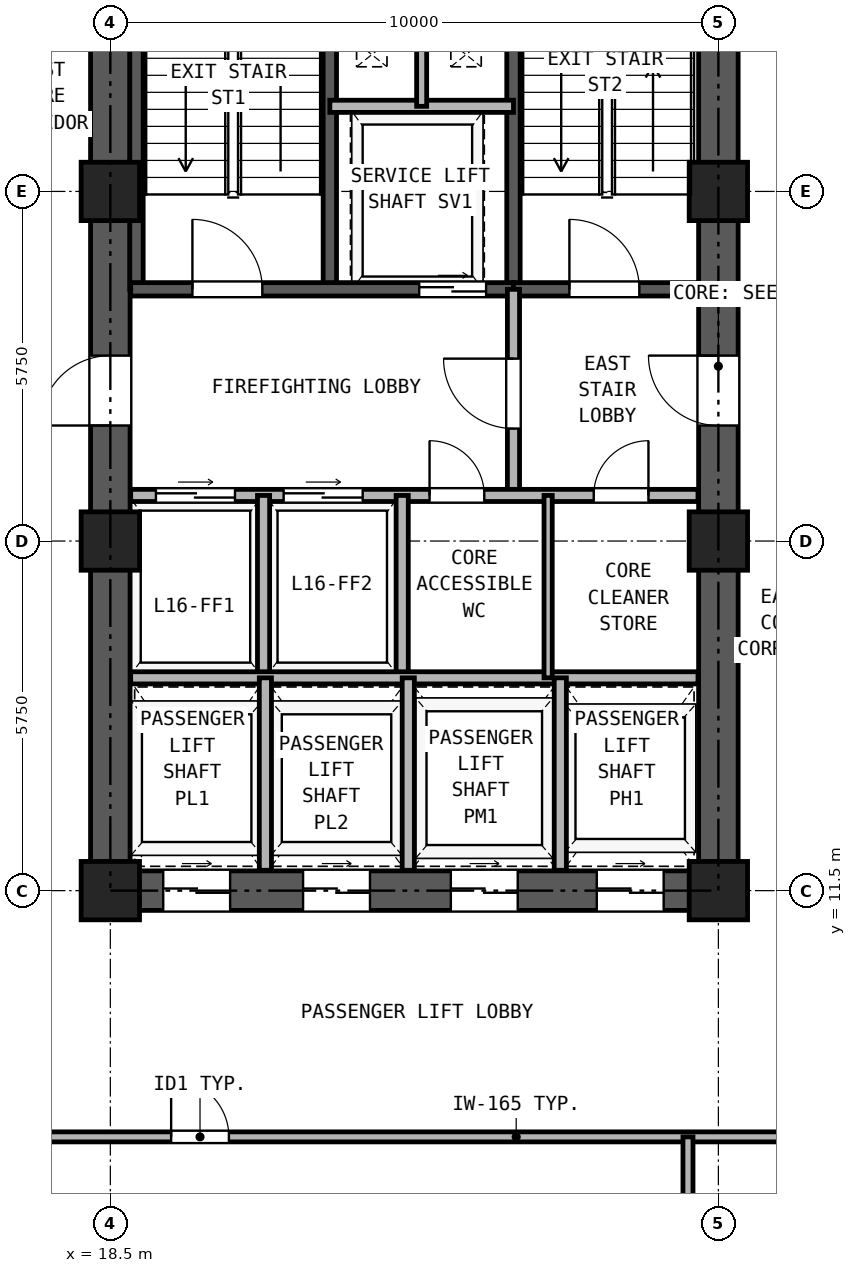
"""IFC4 building model, lengths in metres.
Left out: names, types, materials, properties, quantities, classifications, styles, units other than length and angle.
Written with IfcOpenShell. Run it as: python <this file> out.ifc"""

import sys

from ifc_helpers import new_model, si_unit, direction, frame, frame_2d, origin, origin_2d, place, context, subcontext, project, spatial, rectangle, hollow_rectangle, extrude, source, transform, mapped, element, fill, save


model = new_model("IFC4")
c1 = context("Model", 3, precision=1e-05, world=origin(), true_north=direction((0.0, 1.0)))
c2 = subcontext(c1, "Body", "Model", "MODEL_VIEW")
j1 = project(units=[si_unit("LENGTHUNIT", "METRE"), si_unit("PLANEANGLEUNIT", "RADIAN")], contexts=[c1])
p1 = place(None, origin())
s1 = spatial("IfcSite", under=j1, at=p1, CompositionType="ELEMENT")
p2 = place(p1, origin())
s2 = spatial("IfcBuilding", under=s1, at=p2, CompositionType="ELEMENT")
p3 = place(p2, frame((0.0, 0.0, 62.1)))
s3 = spatial("IfcBuildingStorey", under=s2, at=p3, CompositionType="ELEMENT", Elevation=62.1)
m1 = source(origin(), c2, "Body", "SweptSolid", [
    extrude(hollow_rectangle(XDim=0.96, YDim=0.96, WallThickness=0.06, at=origin_2d()), origin(), (0.0, 0.0, 1.0), 3.32),
])
for number, where, z_axis, x_axis in (
    (1, (18.5, 11.5, 0.0), (0.0, 0.0, 1.0), (1.0, 0.0, 0.0)),
    (2, (18.5, 17.25, 0.0), (0.0, 0.0, 1.0), (1.0, 0.0, 0.0)),
    (3, (18.5, 23.0, 0.0), (0.0, 0.0, 1.0), (1.0, 0.0, 0.0)),
    (4, (28.5, 11.5, 0.0), (0.0, 0.0, 1.0), (1.0, 0.0, 0.0)),
    (5, (28.5, 17.25, 0.0), (0.0, 0.0, 1.0), (1.0, 0.0, 0.0)),
    (6, (28.5, 23.0, 0.0), (0.0, 0.0, 1.0), (1.0, 0.0, 0.0)),
):
    element("IfcColumn", number, at=place(p3, frame(where, z_axis=z_axis, x_axis=x_axis)), inside=s3, PredefinedType="COLUMN", context=c2, shape_type="MappedRepresentation", body=[
        mapped(m1, transform((0.0, 0.0, 0.0), x_axis=(1.0, 0.0, 0.0), y_axis=(0.0, 1.0, 0.0), z_axis=(0.0, 0.0, 1.0), scale=1.0)),
    ])
p4 = place(p3, frame((18.175, 11.5, 0.0), z_axis=(0.0, 0.0, 1.0), x_axis=(1.0, 0.0, 0.0)))
e7 = element("IfcWall", 7, at=p4, inside=s3, PredefinedType="SHEAR", context=c2, shape_type="SweptSolid", body=[
    extrude(rectangle(XDim=10.65, YDim=0.65, at=frame_2d((5.325, 0.0))), origin(), (0.0, 0.0, 1.0), 3.32),
])
p5 = place(p4, frame((1.195, 0.0, 0.0)))
e8 = element("IfcOpeningElement", 8, at=p5, cuts=e7, PredefinedType="OPENING", context=c2, shape_type="SweptSolid", body=[
    extrude(rectangle(XDim=1.1, YDim=2.25, at=frame_2d((0.55, 1.125))), frame((0.0, 0.335, 0.0), z_axis=(0.0, -1.0, 0.0), x_axis=(1.0, 0.0, 0.0)), (0.0, 0.0, 1.0), 0.67),
])
p6 = place(p4, frame((3.495, 0.0, 0.0)))
e9 = element("IfcOpeningElement", 9, at=p6, cuts=e7, PredefinedType="OPENING", context=c2, shape_type="SweptSolid", body=[
    extrude(rectangle(XDim=1.1, YDim=2.25, at=frame_2d((0.55, 1.125))), frame((0.0, 0.335, 0.0), z_axis=(0.0, -1.0, 0.0), x_axis=(1.0, 0.0, 0.0)), (0.0, 0.0, 1.0), 0.67),
])
p7 = place(p4, frame((5.925, 0.0, 0.0)))
e10 = element("IfcOpeningElement", 10, at=p7, cuts=e7, PredefinedType="OPENING", context=c2, shape_type="SweptSolid", body=[
    extrude(rectangle(XDim=1.1, YDim=2.25, at=frame_2d((0.55, 1.125))), frame((0.0, 0.335, 0.0), z_axis=(0.0, -1.0, 0.0), x_axis=(1.0, 0.0, 0.0)), (0.0, 0.0, 1.0), 0.67),
])
p8 = place(p4, frame((8.325, 0.0, 0.0)))
e11 = element("IfcOpeningElement", 11, at=p8, cuts=e7, PredefinedType="OPENING", context=c2, shape_type="SweptSolid", body=[
    extrude(rectangle(XDim=1.1, YDim=2.25, at=frame_2d((0.55, 1.125))), frame((0.0, 0.335, 0.0), z_axis=(0.0, -1.0, 0.0), x_axis=(1.0, 0.0, 0.0)), (0.0, 0.0, 1.0), 0.67),
])
p9 = place(p3, frame((18.5, 11.825, 0.0), z_axis=(0.0, 0.0, 1.0), x_axis=(0.0, 1.0, 0.0)))
e12 = element("IfcWall", 12, at=p9, inside=s3, PredefinedType="SHEAR", context=c2, shape_type="SweptSolid", body=[
    extrude(rectangle(XDim=16.6, YDim=0.65, at=frame_2d((8.3, 0.0))), origin(), (0.0, 0.0, 1.0), 3.32),
])
p10 = place(p9, frame((7.325, 0.0, 0.0)))
e13 = element("IfcOpeningElement", 13, at=p10, cuts=e12, PredefinedType="OPENING", context=c2, shape_type="SweptSolid", body=[
    extrude(rectangle(XDim=1.15, YDim=2.2, at=frame_2d((0.575, 1.1))), frame((0.0, 0.335, 0.0), z_axis=(0.0, -1.0, 0.0), x_axis=(1.0, 0.0, 0.0)), (0.0, 0.0, 1.0), 0.67),
])
p11 = place(p3, frame((28.5, 11.825, 0.0), z_axis=(0.0, 0.0, 1.0), x_axis=(0.0, 1.0, 0.0)))
e14 = element("IfcWall", 14, at=p11, inside=s3, PredefinedType="SHEAR", context=c2, shape_type="SweptSolid", body=[
    extrude(rectangle(XDim=16.6, YDim=0.65, at=frame_2d((8.3, 0.0))), origin(), (0.0, 0.0, 1.0), 3.32),
])
p12 = place(p11, frame((7.325, 0.0, 0.0)))
e15 = element("IfcOpeningElement", 15, at=p12, cuts=e14, PredefinedType="OPENING", context=c2, shape_type="SweptSolid", body=[
    extrude(rectangle(XDim=1.15, YDim=2.2, at=frame_2d((0.575, 1.1))), frame((0.0, 0.335, 0.0), z_axis=(0.0, -1.0, 0.0), x_axis=(1.0, 0.0, 0.0)), (0.0, 0.0, 1.0), 0.67),
])
for number, where, z_axis, x_axis in (
    (16, (18.93, 21.39, 0.0), (0.0, 0.0, 1.0), (0.0, 1.0, 0.0)),
    (17, (22.11, 21.39, 0.0), (0.0, 0.0, 1.0), (0.0, 1.0, 0.0)),
    (18, (25.13, 21.39, 0.0), (0.0, 0.0, 1.0), (0.0, 1.0, 0.0)),
):
    element("IfcWall", number, at=place(p3, frame(where, z_axis=z_axis, x_axis=x_axis)), inside=s3, PredefinedType="SOLIDWALL", context=c2, shape_type="SweptSolid", body=[
        extrude(rectangle(XDim=7.11, YDim=0.22, at=frame_2d((3.555, 0.0))), origin(), (0.0, 0.0, 1.0), 3.32),
    ])
p13 = place(p3, frame((18.835, 21.39, 0.0), z_axis=(0.0, 0.0, 1.0), x_axis=(1.0, 0.0, 0.0)))
e19 = element("IfcWall", 19, at=p13, inside=s3, PredefinedType="SOLIDWALL", context=c2, shape_type="SweptSolid", body=[
    extrude(rectangle(XDim=6.295, YDim=0.22, at=frame_2d((3.147, 0.0))), origin(), (0.0, 0.0, 1.0), 3.32),
])
p14 = place(p13, frame((1.015, 0.0, 0.0)))
e20 = element("IfcOpeningElement", 20, at=p14, cuts=e19, PredefinedType="OPENING", context=c2, shape_type="SweptSolid", body=[
    extrude(rectangle(XDim=1.15, YDim=2.2, at=frame_2d((0.575, 1.1))), frame((0.0, 0.12, 0.0), z_axis=(0.0, -1.0, 0.0), x_axis=(1.0, 0.0, 0.0)), (0.0, 0.0, 1.0), 0.24),
])
p15 = place(p13, frame((4.745, 0.0, 0.0)))
e21 = element("IfcOpeningElement", 21, at=p15, cuts=e19, PredefinedType="OPENING", context=c2, shape_type="SweptSolid", body=[
    extrude(rectangle(XDim=1.1, YDim=2.25, at=frame_2d((0.55, 1.125))), frame((0.0, 0.12, 0.0), z_axis=(0.0, -1.0, 0.0), x_axis=(1.0, 0.0, 0.0)), (0.0, 0.0, 1.0), 0.24),
])
p16 = place(p3, frame((25.13, 21.39, 0.0), z_axis=(0.0, 0.0, 1.0), x_axis=(1.0, 0.0, 0.0)))
e22 = element("IfcWall", 22, at=p16, inside=s3, PredefinedType="SOLIDWALL", context=c2, shape_type="SweptSolid", body=[
    extrude(rectangle(XDim=3.035, YDim=0.22, at=frame_2d((1.518, 0.0))), origin(), (0.0, 0.0, 1.0), 3.32),
])
p17 = place(p16, frame((0.92, 0.0, 0.0)))
e23 = element("IfcOpeningElement", 23, at=p17, cuts=e22, PredefinedType="OPENING", context=c2, shape_type="SweptSolid", body=[
    extrude(rectangle(XDim=1.15, YDim=2.2, at=frame_2d((0.575, 1.1))), frame((0.0, 0.12, 0.0), z_axis=(0.0, -1.0, 0.0), x_axis=(1.0, 0.0, 0.0)), (0.0, 0.0, 1.0), 0.24),
])
p18 = place(p3, frame((22.11, 24.4, 0.0), z_axis=(0.0, 0.0, 1.0), x_axis=(1.0, 0.0, 0.0)))
e24 = element("IfcWall", 24, at=p18, inside=s3, PredefinedType="PARTITIONING", context=c2, shape_type="SweptSolid", body=[
    extrude(rectangle(XDim=3.02, YDim=0.2, at=frame_2d((1.51, 0.0))), origin(), (0.0, 0.0, 1.0), 3.32),
])
p19 = place(p3, frame((23.62, 24.4, 0.0), z_axis=(0.0, 0.0, 1.0), x_axis=(0.0, 1.0, 0.0)))
e25 = element("IfcWall", 25, at=p19, inside=s3, PredefinedType="PARTITIONING", context=c2, shape_type="SweptSolid", body=[
    extrude(rectangle(XDim=4.015, YDim=0.165, at=frame_2d((2.008, 0.0))), origin(), (0.0, 0.0, 1.0), 3.32),
])
p20 = place(p3, frame((25.13, 18.0, 0.0), z_axis=(0.0, 0.0, 1.0), x_axis=(0.0, 1.0, 0.0)))
e26 = element("IfcWall", 26, at=p20, inside=s3, PredefinedType="PARTITIONING", context=c2, shape_type="SweptSolid", body=[
    extrude(rectangle(XDim=3.39, YDim=0.2, at=frame_2d((1.695, 0.0))), origin(), (0.0, 0.0, 1.0), 3.32),
])
p21 = place(p20, frame((1.1, 0.0, 0.0)))
e27 = element("IfcOpeningElement", 27, at=p21, cuts=e26, PredefinedType="OPENING", context=c2, shape_type="SweptSolid", body=[
    extrude(rectangle(XDim=1.15, YDim=2.2, at=frame_2d((0.575, 1.1))), frame((0.0, 0.11, 0.0), z_axis=(0.0, -1.0, 0.0), x_axis=(1.0, 0.0, 0.0)), (0.0, 0.0, 1.0), 0.22),
])
p22 = place(p3, frame((18.835, 18.0, 0.0), z_axis=(0.0, 0.0, 1.0), x_axis=(1.0, 0.0, 0.0)))
e28 = element("IfcWall", 28, at=p22, inside=s3, PredefinedType="PARTITIONING", context=c2, shape_type="SweptSolid", body=[
    extrude(rectangle(XDim=9.33, YDim=0.2, at=frame_2d((4.665, 0.0))), origin(), (0.0, 0.0, 1.0), 3.32),
])
p23 = place(p22, frame((0.415, 0.0, 0.0)))
e29 = element("IfcOpeningElement", 29, at=p23, cuts=e28, PredefinedType="OPENING", context=c2, shape_type="SweptSolid", body=[
    extrude(rectangle(XDim=1.3, YDim=2.3, at=frame_2d((0.65, 1.15))), frame((0.0, 0.11, 0.0), z_axis=(0.0, -1.0, 0.0), x_axis=(1.0, 0.0, 0.0)), (0.0, 0.0, 1.0), 0.22),
])
p24 = place(p22, frame((2.515, 0.0, 0.0)))
e30 = element("IfcOpeningElement", 30, at=p24, cuts=e28, PredefinedType="OPENING", context=c2, shape_type="SweptSolid", body=[
    extrude(rectangle(XDim=1.3, YDim=2.3, at=frame_2d((0.65, 1.15))), frame((0.0, 0.11, 0.0), z_axis=(0.0, -1.0, 0.0), x_axis=(1.0, 0.0, 0.0)), (0.0, 0.0, 1.0), 0.22),
])
p25 = place(p22, frame((4.915, 0.0, 0.0)))
e31 = element("IfcOpeningElement", 31, at=p25, cuts=e28, PredefinedType="OPENING", context=c2, shape_type="SweptSolid", body=[
    extrude(rectangle(XDim=0.9, YDim=2.05, at=frame_2d((0.45, 1.025))), frame((0.0, 0.11, 0.0), z_axis=(0.0, -1.0, 0.0), x_axis=(1.0, 0.0, 0.0)), (0.0, 0.0, 1.0), 0.22),
])
p26 = place(p22, frame((7.615, 0.0, 0.0)))
e32 = element("IfcOpeningElement", 32, at=p26, cuts=e28, PredefinedType="OPENING", context=c2, shape_type="SweptSolid", body=[
    extrude(rectangle(XDim=0.9, YDim=2.05, at=frame_2d((0.45, 1.025))), frame((0.0, 0.11, 0.0), z_axis=(0.0, -1.0, 0.0), x_axis=(1.0, 0.0, 0.0)), (0.0, 0.0, 1.0), 0.22),
])
for number, where, z_axis, x_axis in (
    (33, (21.02, 15.0, 0.0), (0.0, 0.0, 1.0), (0.0, 1.0, 0.0)),
    (34, (23.3, 15.0, 0.0), (0.0, 0.0, 1.0), (0.0, 1.0, 0.0)),
):
    element("IfcWall", number, at=place(p3, frame(where, z_axis=z_axis, x_axis=x_axis)), inside=s3, PredefinedType="PARTITIONING", context=c2, shape_type="SweptSolid", body=[
        extrude(rectangle(XDim=3.0, YDim=0.2, at=frame_2d((1.5, 0.0))), origin(), (0.0, 0.0, 1.0), 3.32),
    ])
p27 = place(p3, frame((18.835, 15.0, 0.0), z_axis=(0.0, 0.0, 1.0), x_axis=(1.0, 0.0, 0.0)))
e35 = element("IfcWall", 35, at=p27, inside=s3, PredefinedType="PARTITIONING", context=c2, shape_type="SweptSolid", body=[
    extrude(rectangle(XDim=9.33, YDim=0.2, at=frame_2d((4.665, 0.0))), origin(), (0.0, 0.0, 1.0), 3.32),
])
p28 = place(p3, frame((25.7, 15.0, 0.0), z_axis=(0.0, 0.0, 1.0), x_axis=(0.0, 1.0, 0.0)))
e36 = element("IfcWall", 36, at=p28, inside=s3, PredefinedType="PARTITIONING", context=c2, shape_type="SweptSolid", body=[
    extrude(rectangle(XDim=3.0, YDim=0.135, at=frame_2d((1.5, 0.0))), origin(), (0.0, 0.0, 1.0), 3.32),
])
for number, where, z_axis, x_axis in (
    (37, (21.05, 11.835, 0.0), (0.0, 0.0, 1.0), (0.0, 1.0, 0.0)),
    (38, (23.4, 11.835, 0.0), (0.0, 0.0, 1.0), (0.0, 1.0, 0.0)),
    (39, (25.9, 11.835, 0.0), (0.0, 0.0, 1.0), (0.0, 1.0, 0.0)),
):
    element("IfcWall", number, at=place(p3, frame(where, z_axis=z_axis, x_axis=x_axis)), inside=s3, PredefinedType="PARTITIONING", context=c2, shape_type="SweptSolid", body=[
        extrude(rectangle(XDim=3.165, YDim=0.2, at=frame_2d((1.583, 0.0))), origin(), (0.0, 0.0, 1.0), 3.32),
    ])
p29 = place(p3, frame((12.0, 7.45, 0.0), z_axis=(0.0, 0.0, 1.0), x_axis=(1.0, 0.0, 0.0)))
e40 = element("IfcWall", 40, at=p29, inside=s3, PredefinedType="PARTITIONING", context=c2, shape_type="SweptSolid", body=[
    extrude(rectangle(XDim=23.0, YDim=0.165, at=frame_2d((11.5, 0.0))), origin(), (0.0, 0.0, 1.0), 3.32),
])
p30 = place(p29, frame((7.5, 0.0, 0.0)))
e41 = element("IfcOpeningElement", 41, at=p30, cuts=e40, PredefinedType="OPENING", context=c2, shape_type="SweptSolid", body=[
    extrude(rectangle(XDim=0.95, YDim=2.15, at=frame_2d((0.475, 1.075))), frame((0.0, 0.093, 0.0), z_axis=(0.0, -1.0, 0.0), x_axis=(1.0, 0.0, 0.0)), (0.0, 0.0, 1.0), 0.185),
])
p31 = place(p29, frame((17.9, 0.0, 0.0)))
e42 = element("IfcOpeningElement", 42, at=p31, cuts=e40, PredefinedType="OPENING", context=c2, shape_type="SweptSolid", body=[
    extrude(rectangle(XDim=0.95, YDim=2.15, at=frame_2d((0.475, 1.075))), frame((0.0, 0.093, 0.0), z_axis=(0.0, -1.0, 0.0), x_axis=(1.0, 0.0, 0.0)), (0.0, 0.0, 1.0), 0.185),
])
p32 = place(p29, frame((21.4, 0.0, 0.0)))
e43 = element("IfcOpeningElement", 43, at=p32, cuts=e40, PredefinedType="OPENING", context=c2, shape_type="SweptSolid", body=[
    extrude(rectangle(XDim=0.92, YDim=2.1, at=frame_2d((0.46, 1.05))), frame((0.0, 0.093, 0.0), z_axis=(0.0, -1.0, 0.0), x_axis=(1.0, 0.0, 0.0)), (0.0, 0.0, 1.0), 0.185),
])
p33 = place(p3, frame((28.0, 0.16, 0.0), z_axis=(0.0, 0.0, 1.0), x_axis=(0.0, 1.0, 0.0)))
e44 = element("IfcWall", 44, at=p33, inside=s3, PredefinedType="PARTITIONING", context=c2, shape_type="SweptSolid", body=[
    extrude(rectangle(XDim=7.29, YDim=0.165, at=frame_2d((3.645, 0.0))), origin(), (0.0, 0.0, 1.0), 3.32),
])
p34 = place(p14, frame((1.15, 0.0, 0.0), z_axis=(0.0, 0.0, 1.0), x_axis=(-1.0, 0.0, 0.0)))
e45 = element("IfcDoor", 45, at=p34, inside=s3, OperationType="SINGLE_SWING_LEFT", PredefinedType="DOOR", context=c2, shape_type="SweptSolid", body=[
    extrude(rectangle(XDim=1.15, YDim=2.2, at=frame_2d((0.575, 1.1))), frame((0.0, 0.025, 0.0), z_axis=(0.0, -1.0, 0.0), x_axis=(1.0, 0.0, 0.0)), (0.0, 0.0, 1.0), 0.05),
])
fill(e20, e45)
p35 = place(p17, frame((1.15, 0.0, 0.0), z_axis=(0.0, 0.0, 1.0), x_axis=(-1.0, 0.0, 0.0)))
e46 = element("IfcDoor", 46, at=p35, inside=s3, OperationType="SINGLE_SWING_LEFT", PredefinedType="DOOR", context=c2, shape_type="SweptSolid", body=[
    extrude(rectangle(XDim=1.15, YDim=2.2, at=frame_2d((0.575, 1.1))), frame((0.0, 0.025, 0.0), z_axis=(0.0, -1.0, 0.0), x_axis=(1.0, 0.0, 0.0)), (0.0, 0.0, 1.0), 0.05),
])
fill(e23, e46)
p36 = place(p15, frame((1.1, 0.0, 0.0), z_axis=(0.0, 0.0, 1.0), x_axis=(-1.0, 0.0, 0.0)))
e47 = element("IfcDoor", 47, at=p36, inside=s3, OperationType="DOUBLE_DOOR_SLIDING", PredefinedType="DOOR", context=c2, shape_type="SweptSolid", body=[
    extrude(rectangle(XDim=1.1, YDim=2.25, at=frame_2d((0.55, 1.125))), frame((0.0, 0.025, 0.0), z_axis=(0.0, -1.0, 0.0), x_axis=(1.0, 0.0, 0.0)), (0.0, 0.0, 1.0), 0.05),
])
fill(e21, e47)
p37 = place(p21, origin())
e48 = element("IfcDoor", 48, at=p37, inside=s3, OperationType="SINGLE_SWING_RIGHT", PredefinedType="DOOR", context=c2, shape_type="SweptSolid", body=[
    extrude(rectangle(XDim=1.15, YDim=2.2, at=frame_2d((0.575, 1.1))), frame((0.0, 0.025, 0.0), z_axis=(0.0, -1.0, 0.0), x_axis=(1.0, 0.0, 0.0)), (0.0, 0.0, 1.0), 0.05),
])
fill(e27, e48)
p38 = place(p23, origin())
e49 = element("IfcDoor", 49, at=p38, inside=s3, OperationType="DOUBLE_DOOR_SLIDING", PredefinedType="DOOR", context=c2, shape_type="SweptSolid", body=[
    extrude(rectangle(XDim=1.3, YDim=2.3, at=frame_2d((0.65, 1.15))), frame((0.0, 0.025, 0.0), z_axis=(0.0, -1.0, 0.0), x_axis=(1.0, 0.0, 0.0)), (0.0, 0.0, 1.0), 0.05),
])
fill(e29, e49)
p39 = place(p24, origin())
e50 = element("IfcDoor", 50, at=p39, inside=s3, OperationType="DOUBLE_DOOR_SLIDING", PredefinedType="DOOR", context=c2, shape_type="SweptSolid", body=[
    extrude(rectangle(XDim=1.3, YDim=2.3, at=frame_2d((0.65, 1.15))), frame((0.0, 0.025, 0.0), z_axis=(0.0, -1.0, 0.0), x_axis=(1.0, 0.0, 0.0)), (0.0, 0.0, 1.0), 0.05),
])
fill(e30, e50)
p40 = place(p25, frame((0.9, 0.0, 0.0), z_axis=(0.0, 0.0, 1.0), x_axis=(-1.0, 0.0, 0.0)))
e51 = element("IfcDoor", 51, at=p40, inside=s3, OperationType="SINGLE_SWING_LEFT", PredefinedType="DOOR", context=c2, shape_type="SweptSolid", body=[
    extrude(rectangle(XDim=0.9, YDim=2.05, at=frame_2d((0.45, 1.025))), frame((0.0, 0.025, 0.0), z_axis=(0.0, -1.0, 0.0), x_axis=(1.0, 0.0, 0.0)), (0.0, 0.0, 1.0), 0.05),
])
fill(e31, e51)
p41 = place(p26, frame((0.9, 0.0, 0.0), z_axis=(0.0, 0.0, 1.0), x_axis=(-1.0, 0.0, 0.0)))
e52 = element("IfcDoor", 52, at=p41, inside=s3, OperationType="SINGLE_SWING_RIGHT", PredefinedType="DOOR", context=c2, shape_type="SweptSolid", body=[
    extrude(rectangle(XDim=0.9, YDim=2.05, at=frame_2d((0.45, 1.025))), frame((0.0, 0.025, 0.0), z_axis=(0.0, -1.0, 0.0), x_axis=(1.0, 0.0, 0.0)), (0.0, 0.0, 1.0), 0.05),
])
fill(e32, e52)
p42 = place(p10, frame((1.15, 0.0, 0.0), z_axis=(0.0, 0.0, 1.0), x_axis=(-1.0, 0.0, 0.0)))
e53 = element("IfcDoor", 53, at=p42, inside=s3, OperationType="SINGLE_SWING_LEFT", PredefinedType="DOOR", context=c2, shape_type="SweptSolid", body=[
    extrude(rectangle(XDim=1.15, YDim=2.2, at=frame_2d((0.575, 1.1))), frame((0.0, 0.025, 0.0), z_axis=(0.0, -1.0, 0.0), x_axis=(1.0, 0.0, 0.0)), (0.0, 0.0, 1.0), 0.05),
])
fill(e13, e53)
p43 = place(p12, origin())
e54 = element("IfcDoor", 54, at=p43, inside=s3, OperationType="SINGLE_SWING_RIGHT", PredefinedType="DOOR", context=c2, shape_type="SweptSolid", body=[
    extrude(rectangle(XDim=1.15, YDim=2.2, at=frame_2d((0.575, 1.1))), frame((0.0, 0.025, 0.0), z_axis=(0.0, -1.0, 0.0), x_axis=(1.0, 0.0, 0.0)), (0.0, 0.0, 1.0), 0.05),
])
fill(e15, e54)
p44 = place(p5, frame((1.1, 0.0, 0.0), z_axis=(0.0, 0.0, 1.0), x_axis=(-1.0, 0.0, 0.0)))
e55 = element("IfcDoor", 55, at=p44, inside=s3, OperationType="DOUBLE_DOOR_SLIDING", PredefinedType="DOOR", context=c2, shape_type="SweptSolid", body=[
    extrude(rectangle(XDim=1.1, YDim=2.25, at=frame_2d((0.55, 1.125))), frame((0.0, 0.025, 0.0), z_axis=(0.0, -1.0, 0.0), x_axis=(1.0, 0.0, 0.0)), (0.0, 0.0, 1.0), 0.05),
])
fill(e8, e55)
p45 = place(p6, frame((1.1, 0.0, 0.0), z_axis=(0.0, 0.0, 1.0), x_axis=(-1.0, 0.0, 0.0)))
e56 = element("IfcDoor", 56, at=p45, inside=s3, OperationType="DOUBLE_DOOR_SLIDING", PredefinedType="DOOR", context=c2, shape_type="SweptSolid", body=[
    extrude(rectangle(XDim=1.1, YDim=2.25, at=frame_2d((0.55, 1.125))), frame((0.0, 0.025, 0.0), z_axis=(0.0, -1.0, 0.0), x_axis=(1.0, 0.0, 0.0)), (0.0, 0.0, 1.0), 0.05),
])
fill(e9, e56)
p46 = place(p7, frame((1.1, 0.0, 0.0), z_axis=(0.0, 0.0, 1.0), x_axis=(-1.0, 0.0, 0.0)))
e57 = element("IfcDoor", 57, at=p46, inside=s3, OperationType="DOUBLE_DOOR_SLIDING", PredefinedType="DOOR", context=c2, shape_type="SweptSolid", body=[
    extrude(rectangle(XDim=1.1, YDim=2.25, at=frame_2d((0.55, 1.125))), frame((0.0, 0.025, 0.0), z_axis=(0.0, -1.0, 0.0), x_axis=(1.0, 0.0, 0.0)), (0.0, 0.0, 1.0), 0.05),
])
fill(e10, e57)
p47 = place(p8, frame((1.1, 0.0, 0.0), z_axis=(0.0, 0.0, 1.0), x_axis=(-1.0, 0.0, 0.0)))
e58 = element("IfcDoor", 58, at=p47, inside=s3, OperationType="DOUBLE_DOOR_SLIDING", PredefinedType="DOOR", context=c2, shape_type="SweptSolid", body=[
    extrude(rectangle(XDim=1.1, YDim=2.25, at=frame_2d((0.55, 1.125))), frame((0.0, 0.025, 0.0), z_axis=(0.0, -1.0, 0.0), x_axis=(1.0, 0.0, 0.0)), (0.0, 0.0, 1.0), 0.05),
])
fill(e11, e58)
p48 = place(p30, frame((0.95, 0.0, 0.0), z_axis=(0.0, 0.0, 1.0), x_axis=(-1.0, 0.0, 0.0)))
e59 = element("IfcDoor", 59, at=p48, inside=s3, OperationType="SINGLE_SWING_LEFT", PredefinedType="DOOR", context=c2, shape_type="SweptSolid", body=[
    extrude(rectangle(XDim=0.95, YDim=2.15, at=frame_2d((0.475, 1.075))), frame((0.0, 0.025, 0.0), z_axis=(0.0, -1.0, 0.0), x_axis=(1.0, 0.0, 0.0)), (0.0, 0.0, 1.0), 0.05),
])
fill(e41, e59)
save(model, sys.argv[1])
